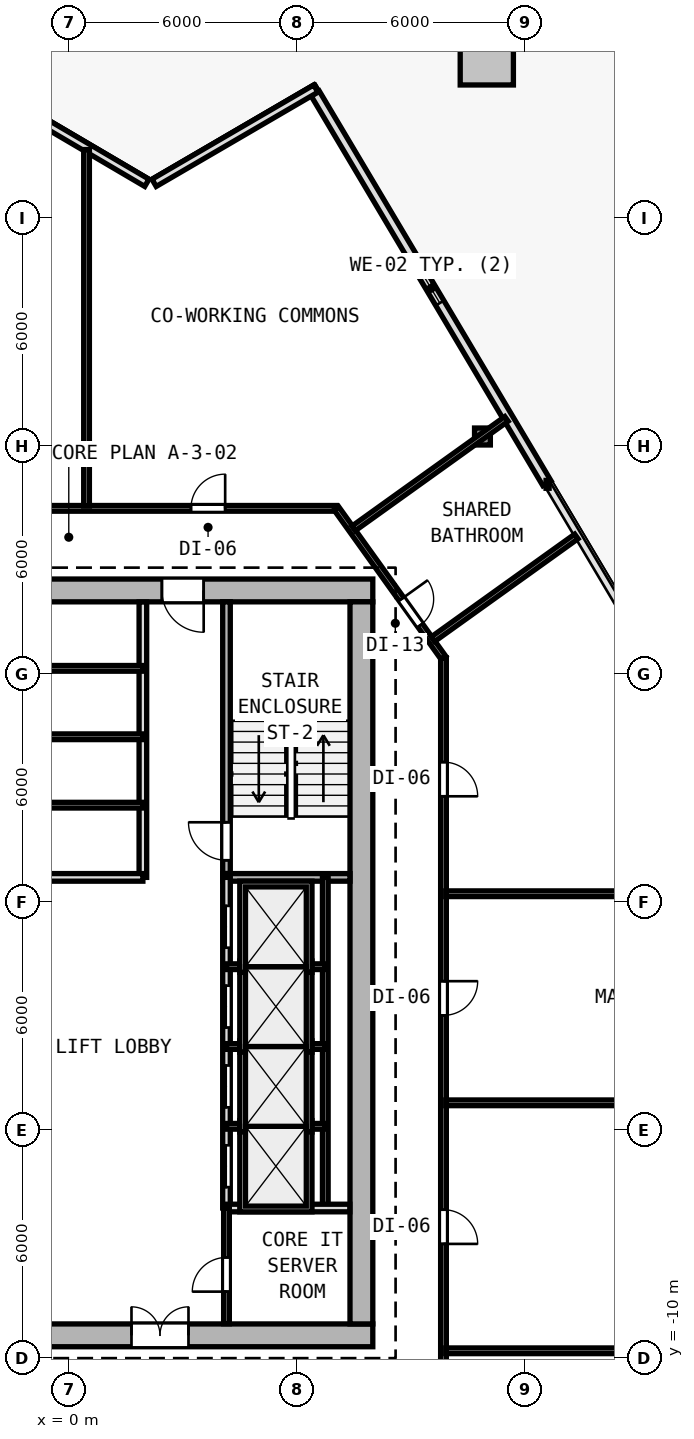
"""IFC4 building model, lengths in metres.
Left out: names, types, materials, properties, quantities, classifications, styles, units other than length and angle.
Written with IfcOpenShell. Run it as: python <this file> out.ifc"""

import sys

from ifc_helpers import new_model, si_unit, direction, frame, frame_2d, origin, origin_2d, place, context, subcontext, project, spatial, rectangle, i_section, extrude, element, fill, save


model = new_model("IFC4")
c1 = context("Model", 3, precision=1e-05, world=origin(), true_north=direction((0.0, 1.0)))
c2 = subcontext(c1, "Body", "Model", "MODEL_VIEW")
j1 = project(units=[si_unit("LENGTHUNIT", "METRE"), si_unit("PLANEANGLEUNIT", "RADIAN")], contexts=[c1])
p1 = place(None, origin())
s1 = spatial("IfcSite", under=j1, at=p1, CompositionType="ELEMENT")
p2 = place(p1, origin())
s2 = spatial("IfcBuilding", under=s1, at=p2, CompositionType="ELEMENT")
p3 = place(p2, frame((0.0, 0.0, 26.4)))
s3 = spatial("IfcBuildingStorey", under=s2, at=p3, CompositionType="ELEMENT", Elevation=26.4)
for number, where, z_axis, x_axis in (
    (1, (7.7, -9.4, 0.0), (0.0, 0.0, 1.0), (1.0, 0.0, 0.0)),
    (2, (7.7, 10.2, 0.0), (0.0, 0.0, 1.0), (1.0, 0.0, 0.0)),
    (3, (0.0, -9.4, 0.0), (0.0, 0.0, 1.0), (1.0, 0.0, 0.0)),
    (4, (7.7, 0.4, 0.0), (0.0, 0.0, 1.0), (1.0, 0.0, 0.0)),
):
    element("IfcColumn", number, at=place(p3, frame(where, z_axis=z_axis, x_axis=x_axis)), inside=s3, PredefinedType="COLUMN", context=c2, shape_type="SweptSolid", body=[
        extrude(i_section(OverallWidth=0.416, OverallDepth=0.446, WebThickness=0.025, FlangeThickness=0.04, FilletRadius=0.015, at=origin_2d()), origin(), (0.0, 0.0, 1.0), 3.6),
    ])
p4 = place(p3, frame((10.885, 14.25, 0.015), z_axis=(-0.0117309588, -0.002591723456, 0.999927831183), x_axis=(0.215728093413, -0.976453475447, 0.0)))
e5 = element("IfcColumn", 5, at=p4, inside=s3, PredefinedType="COLUMN", context=c2, shape_type="SweptSolid", body=[
    extrude(i_section(OverallWidth=0.416, OverallDepth=0.446, WebThickness=0.025, FlangeThickness=0.04, FilletRadius=0.015, at=origin_2d()), origin(), (0.0, 0.0, 1.0), 3.58),
])
p5 = place(p3, frame((6.483, 23.278, 0.0), z_axis=(0.0, 0.0, 1.0), x_axis=(0.511086421046, -0.859529330635, 0.0)))
e6 = element("IfcWall", 6, at=p5, inside=s3, PredefinedType="SOLIDWALL", context=c2, shape_type="SweptSolid", body=[
    extrude(rectangle(XDim=11.935, YDim=0.25, at=frame_2d((5.968, 0.0))), origin(), (0.0, 0.0, 1.0), 3.35),
])
p6 = place(p5, frame((5.518, 0.0, 0.62)))
e7 = element("IfcOpeningElement", 7, at=p6, cuts=e6, PredefinedType="OPENING", context=c2, shape_type="SweptSolid", body=[
    extrude(rectangle(XDim=0.9, YDim=1.6, at=frame_2d((0.45, 0.8))), frame((0.0, 0.135, 0.0), z_axis=(0.0, -1.0, 0.0), x_axis=(1.0, 0.0, 0.0)), (0.0, 0.0, 1.0), 0.27),
])
p7 = place(p3, frame((2.245, 20.925, 0.0), z_axis=(0.0, 0.0, 1.0), x_axis=(0.863967641515, 0.503547330858, 0.0)))
e8 = element("IfcWall", 8, at=p7, inside=s3, PredefinedType="SOLIDWALL", context=c2, shape_type="SweptSolid", body=[
    extrude(rectangle(XDim=4.925, YDim=0.22, at=frame_2d((2.462, 0.0))), origin(), (0.0, 0.0, 1.0), 3.35),
])
p8 = place(p3, frame((-2.635, 23.681, 0.0), z_axis=(0.0, 0.0, 1.0), x_axis=(0.862126841454, -0.506692519428, 0.0)))
e9 = element("IfcWall", 9, at=p8, inside=s3, PredefinedType="SOLIDWALL", context=c2, shape_type="SweptSolid", body=[
    extrude(rectangle(XDim=5.439, YDim=0.22, at=frame_2d((2.72, 0.0))), origin(), (0.0, 0.0, 1.0), 3.35),
])
p9 = place(p3, frame((-8.0, -9.4, 0.0), z_axis=(0.0, 0.0, 1.0), x_axis=(1.0, 0.0, 0.0)))
e10 = element("IfcWall", 10, at=p9, inside=s3, PredefinedType="SHEAR", context=c2, shape_type="SweptSolid", body=[
    extrude(rectangle(XDim=16.0, YDim=0.6, at=frame_2d((8.0, 0.0))), origin(), (0.0, 0.0, 1.0), 3.35),
])
p10 = place(p9, frame((9.65, 0.0, 0.0)))
e11 = element("IfcOpeningElement", 11, at=p10, cuts=e10, PredefinedType="OPENING", context=c2, shape_type="SweptSolid", body=[
    extrude(rectangle(XDim=1.5, YDim=2.2, at=frame_2d((0.75, 1.1))), frame((0.0, 0.31, 0.0), z_axis=(0.0, -1.0, 0.0), x_axis=(1.0, 0.0, 0.0)), (0.0, 0.0, 1.0), 0.62),
])
p11 = place(p3, frame((8.0, 10.2, 0.0), z_axis=(0.0, 0.0, 1.0), x_axis=(-1.0, 0.0, 0.0)))
e12 = element("IfcWall", 12, at=p11, inside=s3, PredefinedType="SHEAR", context=c2, shape_type="SweptSolid", body=[
    extrude(rectangle(XDim=16.0, YDim=0.6, at=frame_2d((8.0, 0.0))), origin(), (0.0, 0.0, 1.0), 3.35),
])
p12 = place(p11, frame((4.45, 0.0, 0.0)))
e13 = element("IfcOpeningElement", 13, at=p12, cuts=e12, PredefinedType="OPENING", context=c2, shape_type="SweptSolid", body=[
    extrude(rectangle(XDim=1.1, YDim=2.15, at=frame_2d((0.55, 1.075))), frame((0.0, 0.31, 0.0), z_axis=(0.0, -1.0, 0.0), x_axis=(1.0, 0.0, 0.0)), (0.0, 0.0, 1.0), 0.62),
])
p13 = place(p3, frame((7.7, 9.9, 0.0), z_axis=(0.0, 0.0, 1.0), x_axis=(0.0, -1.0, 0.0)))
e14 = element("IfcWall", 14, at=p13, inside=s3, PredefinedType="SHEAR", context=c2, shape_type="SweptSolid", body=[
    extrude(rectangle(XDim=19.0, YDim=0.6, at=frame_2d((9.5, 0.0))), origin(), (0.0, 0.0, 1.0), 3.35),
])
p14 = place(p3, frame((4.15, 2.75, 0.0), z_axis=(0.0, 0.0, 1.0), x_axis=(0.0, 1.0, 0.0)))
e15 = element("IfcWall", 15, at=p14, inside=s3, PredefinedType="SOLIDWALL", context=c2, shape_type="SweptSolid", body=[
    extrude(rectangle(XDim=7.15, YDim=0.2, at=frame_2d((3.575, 0.0))), origin(), (0.0, 0.0, 1.0), 3.35),
])
p15 = place(p14, frame((0.35, 0.0, 0.0)))
e16 = element("IfcOpeningElement", 16, at=p15, cuts=e15, PredefinedType="OPENING", context=c2, shape_type="SweptSolid", body=[
    extrude(rectangle(XDim=1.0, YDim=2.15, at=frame_2d((0.5, 1.075))), frame((0.0, 0.11, 0.0), z_axis=(0.0, -1.0, 0.0), x_axis=(1.0, 0.0, 0.0)), (0.0, 0.0, 1.0), 0.22),
])
p16 = place(p3, frame((4.05, 2.65, 0.0), z_axis=(0.0, 0.0, 1.0), x_axis=(1.0, 0.0, 0.0)))
e17 = element("IfcWall", 17, at=p16, inside=s3, PredefinedType="SOLIDWALL", context=c2, shape_type="SweptSolid", body=[
    extrude(rectangle(XDim=3.35, YDim=0.2, at=frame_2d((1.675, 0.0))), origin(), (0.0, 0.0, 1.0), 3.35),
])
p17 = place(p3, frame((4.15, -6.05, 0.0), z_axis=(0.0, 0.0, 1.0), x_axis=(0.0, 1.0, 0.0)))
e18 = element("IfcWall", 18, at=p17, inside=s3, PredefinedType="SOLIDWALL", context=c2, shape_type="SweptSolid", body=[
    extrude(rectangle(XDim=8.7, YDim=0.2, at=frame_2d((4.35, 0.0))), origin(), (0.0, 0.0, 1.0), 3.35),
])
p18 = place(p17, frame((0.55, 0.0, 0.0)))
e19 = element("IfcOpeningElement", 19, at=p18, cuts=e18, PredefinedType="OPENING", context=c2, shape_type="SweptSolid", body=[
    extrude(rectangle(XDim=1.1, YDim=2.15, at=frame_2d((0.55, 1.075))), frame((0.0, 0.11, 0.0), z_axis=(0.0, -1.0, 0.0), x_axis=(1.0, 0.0, 0.0)), (0.0, 0.0, 1.0), 0.22),
])
p19 = place(p17, frame((2.65, 0.0, 0.0)))
e20 = element("IfcOpeningElement", 20, at=p19, cuts=e18, PredefinedType="OPENING", context=c2, shape_type="SweptSolid", body=[
    extrude(rectangle(XDim=1.1, YDim=2.15, at=frame_2d((0.55, 1.075))), frame((0.0, 0.11, 0.0), z_axis=(0.0, -1.0, 0.0), x_axis=(1.0, 0.0, 0.0)), (0.0, 0.0, 1.0), 0.22),
])
p20 = place(p17, frame((4.75, 0.0, 0.0)))
e21 = element("IfcOpeningElement", 21, at=p20, cuts=e18, PredefinedType="OPENING", context=c2, shape_type="SweptSolid", body=[
    extrude(rectangle(XDim=1.1, YDim=2.15, at=frame_2d((0.55, 1.075))), frame((0.0, 0.11, 0.0), z_axis=(0.0, -1.0, 0.0), x_axis=(1.0, 0.0, 0.0)), (0.0, 0.0, 1.0), 0.22),
])
p21 = place(p17, frame((6.85, 0.0, 0.0)))
e22 = element("IfcOpeningElement", 22, at=p21, cuts=e18, PredefinedType="OPENING", context=c2, shape_type="SweptSolid", body=[
    extrude(rectangle(XDim=1.1, YDim=2.15, at=frame_2d((0.55, 1.075))), frame((0.0, 0.11, 0.0), z_axis=(0.0, -1.0, 0.0), x_axis=(1.0, 0.0, 0.0)), (0.0, 0.0, 1.0), 0.22),
])
p22 = place(p3, frame((6.75, -6.05, 0.0), z_axis=(0.0, 0.0, 1.0), x_axis=(0.0, 1.0, 0.0)))
e23 = element("IfcWall", 23, at=p22, inside=s3, PredefinedType="PARTITIONING", context=c2, shape_type="SweptSolid", body=[
    extrude(rectangle(XDim=8.7, YDim=0.15, at=frame_2d((4.35, 0.0))), origin(), (0.0, 0.0, 1.0), 3.35),
])
for number, where, z_axis, x_axis in (
    (24, (4.15, -3.9, 0.0), (0.0, 0.0, 1.0), (1.0, 0.0, 0.0)),
    (25, (4.15, -1.8, 0.0), (0.0, 0.0, 1.0), (1.0, 0.0, 0.0)),
    (26, (4.15, 0.3, 0.0), (0.0, 0.0, 1.0), (1.0, 0.0, 0.0)),
):
    element("IfcWall", number, at=place(p3, frame(where, z_axis=z_axis, x_axis=x_axis)), inside=s3, PredefinedType="PARTITIONING", context=c2, shape_type="SweptSolid", body=[
        extrude(rectangle(XDim=2.6, YDim=0.15, at=frame_2d((1.3, 0.0))), origin(), (0.0, 0.0, 1.0), 3.35),
    ])
p23 = place(p3, frame((1.95, 2.65, 0.0), z_axis=(0.0, 0.0, 1.0), x_axis=(0.0, 1.0, 0.0)))
e27 = element("IfcWall", 27, at=p23, inside=s3, PredefinedType="SOLIDWALL", context=c2, shape_type="SweptSolid", body=[
    extrude(rectangle(XDim=7.245, YDim=0.2, at=frame_2d((3.623, 0.0))), origin(), (0.0, 0.0, 1.0), 3.35),
])
p24 = place(p3, frame((-0.95, 2.65, 0.0), z_axis=(0.0, 0.0, 1.0), x_axis=(1.0, 0.0, 0.0)))
e28 = element("IfcWall", 28, at=p24, inside=s3, PredefinedType="SOLIDWALL", context=c2, shape_type="SweptSolid", body=[
    extrude(rectangle(XDim=2.9, YDim=0.2, at=frame_2d((1.45, 0.0))), origin(), (0.0, 0.0, 1.0), 3.35),
])
for number, where, z_axis, x_axis in (
    (29, (-0.75, 4.55, 0.0), (0.0, 0.0, 1.0), (1.0, 0.0, 0.0)),
    (30, (-0.75, 6.35, 0.0), (0.0, 0.0, 1.0), (1.0, 0.0, 0.0)),
    (31, (-0.75, 8.15, 0.0), (0.0, 0.0, 1.0), (1.0, 0.0, 0.0)),
):
    element("IfcWall", number, at=place(p3, frame(where, z_axis=z_axis, x_axis=x_axis)), inside=s3, PredefinedType="PARTITIONING", context=c2, shape_type="SweptSolid", body=[
        extrude(rectangle(XDim=2.7, YDim=0.15, at=frame_2d((1.35, 0.0))), origin(), (0.0, 0.0, 1.0), 3.35),
    ])
p25 = place(p3, frame((4.15, -6.05, 0.0), z_axis=(0.0, 0.0, 1.0), x_axis=(1.0, 0.0, 0.0)))
e32 = element("IfcWall", 32, at=p25, inside=s3, PredefinedType="SOLIDWALL", context=c2, shape_type="SweptSolid", body=[
    extrude(rectangle(XDim=3.245, YDim=0.2, at=frame_2d((1.623, 0.0))), origin(), (0.0, 0.0, 1.0), 3.35),
])
p26 = place(p3, frame((4.15, -9.095, 0.0), z_axis=(0.0, 0.0, 1.0), x_axis=(0.0, 1.0, 0.0)))
e33 = element("IfcWall", 33, at=p26, inside=s3, PredefinedType="PARTITIONING", context=c2, shape_type="SweptSolid", body=[
    extrude(rectangle(XDim=3.045, YDim=0.15, at=frame_2d((1.522, 0.0))), origin(), (0.0, 0.0, 1.0), 3.35),
])
p27 = place(p26, frame((0.845, 0.0, 0.0)))
e34 = element("IfcOpeningElement", 34, at=p27, cuts=e33, PredefinedType="OPENING", context=c2, shape_type="SweptSolid", body=[
    extrude(rectangle(XDim=0.9, YDim=2.1, at=frame_2d((0.45, 1.05))), frame((0.0, 0.085, 0.0), z_axis=(0.0, -1.0, 0.0), x_axis=(1.0, 0.0, 0.0)), (0.0, 0.0, 1.0), 0.17),
])
p28 = place(p3, frame((-7.041, 12.36, 0.0), z_axis=(0.0, 0.0, 1.0), x_axis=(1.0, 0.0, 0.0)))
e35 = element("IfcWall", 35, at=p28, inside=s3, PredefinedType="PARTITIONING", context=c2, shape_type="SweptSolid", body=[
    extrude(rectangle(XDim=14.082, YDim=0.15, at=frame_2d((7.041, 0.0))), origin(), (0.0, 0.0, 1.0), 3.35),
])
p29 = place(p28, frame((10.256, 0.0, 0.0)))
e36 = element("IfcOpeningElement", 36, at=p29, cuts=e35, PredefinedType="OPENING", context=c2, shape_type="SweptSolid", body=[
    extrude(rectangle(XDim=0.9, YDim=2.1, at=frame_2d((0.45, 1.05))), frame((0.0, 0.085, 0.0), z_axis=(0.0, -1.0, 0.0), x_axis=(1.0, 0.0, 0.0)), (0.0, 0.0, 1.0), 0.17),
])
p30 = place(p28, frame((3.393, 0.0, 0.0)))
e37 = element("IfcOpeningElement", 37, at=p30, cuts=e35, PredefinedType="OPENING", context=c2, shape_type="SweptSolid", body=[
    extrude(rectangle(XDim=0.9, YDim=2.1, at=frame_2d((0.45, 1.05))), frame((0.0, 0.085, 0.0), z_axis=(0.0, -1.0, 0.0), x_axis=(1.0, 0.0, 0.0)), (0.0, 0.0, 1.0), 0.17),
])
p31 = place(p3, frame((7.041, 12.36, 0.0), z_axis=(0.0, 0.0, 1.0), x_axis=(0.582449511476, -0.812866881218, 0.0)))
e38 = element("IfcWall", 38, at=p31, inside=s3, PredefinedType="PARTITIONING", context=c2, shape_type="SweptSolid", body=[
    extrude(rectangle(XDim=4.84, YDim=0.15, at=frame_2d((2.42, 0.0))), origin(), (0.0, 0.0, 1.0), 2.725),
])
p32 = place(p31, frame((2.937, 0.0, 0.0)))
e39 = element("IfcOpeningElement", 39, at=p32, cuts=e38, PredefinedType="OPENING", context=c2, shape_type="SweptSolid", body=[
    extrude(rectangle(XDim=0.85, YDim=2.1, at=frame_2d((0.425, 1.05))), frame((0.0, 0.085, 0.0), z_axis=(0.0, -1.0, 0.0), x_axis=(1.0, 0.0, 0.0)), (0.0, 0.0, 1.0), 0.17),
])
p33 = place(p3, frame((9.86, 8.426, 0.0), z_axis=(0.0, 0.0, 1.0), x_axis=(0.0, -1.0, 0.0)))
e40 = element("IfcWall", 40, at=p33, inside=s3, PredefinedType="PARTITIONING", context=c2, shape_type="SweptSolid", body=[
    extrude(rectangle(XDim=19.986, YDim=0.15, at=frame_2d((9.993, 0.0))), origin(), (0.0, 0.0, 1.0), 2.609),
])
p34 = place(p33, frame((18.67, 0.0, 0.0)))
e41 = element("IfcOpeningElement", 41, at=p34, cuts=e40, PredefinedType="OPENING", context=c2, shape_type="SweptSolid", body=[
    extrude(rectangle(XDim=0.85, YDim=2.1, at=frame_2d((0.425, 1.05))), frame((0.0, 0.085, 0.0), z_axis=(0.0, -1.0, 0.0), x_axis=(1.0, 0.0, 0.0)), (0.0, 0.0, 1.0), 0.17),
])
p35 = place(p33, frame((14.52, 0.0, 0.0)))
e42 = element("IfcOpeningElement", 42, at=p35, cuts=e40, PredefinedType="OPENING", context=c2, shape_type="SweptSolid", body=[
    extrude(rectangle(XDim=0.9, YDim=2.1, at=frame_2d((0.45, 1.05))), frame((0.0, 0.085, 0.0), z_axis=(0.0, -1.0, 0.0), x_axis=(1.0, 0.0, 0.0)), (0.0, 0.0, 1.0), 0.17),
])
p36 = place(p33, frame((8.507, 0.0, 0.0)))
e43 = element("IfcOpeningElement", 43, at=p36, cuts=e40, PredefinedType="OPENING", context=c2, shape_type="SweptSolid", body=[
    extrude(rectangle(XDim=0.9, YDim=2.1, at=frame_2d((0.45, 1.05))), frame((0.0, 0.085, 0.0), z_axis=(0.0, -1.0, 0.0), x_axis=(1.0, 0.0, 0.0)), (0.0, 0.0, 1.0), 0.17),
])
p37 = place(p33, frame((2.742, 0.0, 0.0)))
e44 = element("IfcOpeningElement", 44, at=p37, cuts=e40, PredefinedType="OPENING", context=c2, shape_type="SweptSolid", body=[
    extrude(rectangle(XDim=0.9, YDim=2.1, at=frame_2d((0.45, 1.05))), frame((0.0, 0.085, 0.0), z_axis=(0.0, -1.0, 0.0), x_axis=(1.0, 0.0, 0.0)), (0.0, 0.0, 1.0), 0.17),
])
p38 = place(p3, frame((9.92, -9.807, 0.0), z_axis=(0.0, 0.0, 1.0), x_axis=(1.0, 0.0, 0.0)))
e45 = element("IfcWall", 45, at=p38, inside=s3, PredefinedType="PARTITIONING", context=c2, shape_type="SweptSolid", body=[
    extrude(rectangle(XDim=16.178, YDim=0.15, at=frame_2d((8.089, 0.0))), origin(), (0.0, 0.0, 1.0), 2.609),
])
p39 = place(p3, frame((9.92, 2.219, 0.0), z_axis=(0.0, 0.0, 1.0), x_axis=(1.0, 0.0, 0.0)))
e46 = element("IfcWall", 46, at=p39, inside=s3, PredefinedType="PARTITIONING", context=c2, shape_type="SweptSolid", body=[
    extrude(rectangle(XDim=9.027, YDim=0.15, at=frame_2d((4.513, 0.0))), origin(), (0.0, 0.0, 1.0), 2.735),
])
p40 = place(p3, frame((7.494, 11.831, 0.0), z_axis=(0.0, 0.0, 1.0), x_axis=(0.812879401772, 0.582432037386, 0.0)))
e47 = element("IfcWall", 47, at=p40, inside=s3, PredefinedType="PARTITIONING", context=c2, shape_type="SweptSolid", body=[
    extrude(rectangle(XDim=4.95, YDim=0.15, at=frame_2d((2.475, 0.0))), origin(), (0.0, 0.0, 1.0), 2.725),
])
p41 = place(p3, frame((9.92, -3.282, 0.0), z_axis=(0.0, 0.0, 1.0), x_axis=(1.0, 0.0, 0.0)))
e48 = element("IfcWall", 48, at=p41, inside=s3, PredefinedType="PARTITIONING", context=c2, shape_type="SweptSolid", body=[
    extrude(rectangle(XDim=12.298, YDim=0.15, at=frame_2d((6.149, 0.0))), origin(), (0.0, 0.0, 1.0), 2.735),
])
p42 = place(p3, frame((9.582, 8.917, 0.0), z_axis=(0.0, 0.0, 1.0), x_axis=(0.812883510428, 0.582426303041, 0.0)))
e49 = element("IfcWall", 49, at=p42, inside=s3, PredefinedType="PARTITIONING", context=c2, shape_type="SweptSolid", body=[
    extrude(rectangle(XDim=4.643, YDim=0.15, at=frame_2d((2.322, 0.0))), origin(), (0.0, 0.0, 1.0), 2.735),
])
p43 = place(p3, frame((0.468, 12.42, 0.0), z_axis=(0.0, 0.0, 1.0), x_axis=(0.0, 1.0, 0.0)))
e50 = element("IfcWall", 50, at=p43, inside=s3, PredefinedType="PARTITIONING", context=c2, shape_type="SweptSolid", body=[
    extrude(rectangle(XDim=9.38, YDim=0.15, at=frame_2d((4.69, 0.0))), origin(), (0.0, 0.0, 1.0), 2.735),
])
p44 = place(p6, origin())
e51 = element("IfcWindow", 51, at=p44, inside=s3, PartitioningType="SINGLE_PANEL", PredefinedType="WINDOW", context=c2, shape_type="SweptSolid", body=[
    extrude(rectangle(XDim=0.9, YDim=1.6, at=frame_2d((0.45, 0.8))), frame((0.0, 0.03, 0.0), z_axis=(0.0, -1.0, 0.0), x_axis=(1.0, 0.0, 0.0)), (0.0, 0.0, 1.0), 0.06),
])
fill(e7, e51)
p45 = place(p10, origin())
e52 = element("IfcDoor", 52, at=p45, inside=s3, OperationType="DOUBLE_DOOR_SINGLE_SWING", PredefinedType="DOOR", context=c2, shape_type="SweptSolid", body=[
    extrude(rectangle(XDim=1.5, YDim=2.2, at=frame_2d((0.75, 1.1))), frame((0.0, 0.025, 0.0), z_axis=(0.0, -1.0, 0.0), x_axis=(1.0, 0.0, 0.0)), (0.0, 0.0, 1.0), 0.05),
])
fill(e11, e52)
p46 = place(p12, origin())
e53 = element("IfcDoor", 53, at=p46, inside=s3, OperationType="SINGLE_SWING_LEFT", PredefinedType="DOOR", context=c2, shape_type="SweptSolid", body=[
    extrude(rectangle(XDim=1.1, YDim=2.15, at=frame_2d((0.55, 1.075))), frame((0.0, 0.025, 0.0), z_axis=(0.0, -1.0, 0.0), x_axis=(1.0, 0.0, 0.0)), (0.0, 0.0, 1.0), 0.05),
])
fill(e13, e53)
p47 = place(p15, origin())
e54 = element("IfcDoor", 54, at=p47, inside=s3, OperationType="SINGLE_SWING_RIGHT", PredefinedType="DOOR", context=c2, shape_type="SweptSolid", body=[
    extrude(rectangle(XDim=1.0, YDim=2.15, at=frame_2d((0.5, 1.075))), frame((0.0, 0.025, 0.0), z_axis=(0.0, -1.0, 0.0), x_axis=(1.0, 0.0, 0.0)), (0.0, 0.0, 1.0), 0.05),
])
fill(e16, e54)
p48 = place(p18, origin())
e55 = element("IfcDoor", 55, at=p48, inside=s3, OperationType="DOUBLE_DOOR_SLIDING", PredefinedType="DOOR", context=c2, shape_type="SweptSolid", body=[
    extrude(rectangle(XDim=1.1, YDim=2.15, at=frame_2d((0.55, 1.075))), frame((0.0, 0.025, 0.0), z_axis=(0.0, -1.0, 0.0), x_axis=(1.0, 0.0, 0.0)), (0.0, 0.0, 1.0), 0.05),
])
fill(e19, e55)
p49 = place(p19, origin())
e56 = element("IfcDoor", 56, at=p49, inside=s3, OperationType="DOUBLE_DOOR_SLIDING", PredefinedType="DOOR", context=c2, shape_type="SweptSolid", body=[
    extrude(rectangle(XDim=1.1, YDim=2.15, at=frame_2d((0.55, 1.075))), frame((0.0, 0.025, 0.0), z_axis=(0.0, -1.0, 0.0), x_axis=(1.0, 0.0, 0.0)), (0.0, 0.0, 1.0), 0.05),
])
fill(e20, e56)
p50 = place(p20, origin())
e57 = element("IfcDoor", 57, at=p50, inside=s3, OperationType="DOUBLE_DOOR_SLIDING", PredefinedType="DOOR", context=c2, shape_type="SweptSolid", body=[
    extrude(rectangle(XDim=1.1, YDim=2.15, at=frame_2d((0.55, 1.075))), frame((0.0, 0.025, 0.0), z_axis=(0.0, -1.0, 0.0), x_axis=(1.0, 0.0, 0.0)), (0.0, 0.0, 1.0), 0.05),
])
fill(e21, e57)
p51 = place(p21, origin())
e58 = element("IfcDoor", 58, at=p51, inside=s3, OperationType="DOUBLE_DOOR_SLIDING", PredefinedType="DOOR", context=c2, shape_type="SweptSolid", body=[
    extrude(rectangle(XDim=1.1, YDim=2.15, at=frame_2d((0.55, 1.075))), frame((0.0, 0.025, 0.0), z_axis=(0.0, -1.0, 0.0), x_axis=(1.0, 0.0, 0.0)), (0.0, 0.0, 1.0), 0.05),
])
fill(e22, e58)
p52 = place(p27, origin())
e59 = element("IfcDoor", 59, at=p52, inside=s3, OperationType="SINGLE_SWING_LEFT", PredefinedType="DOOR", context=c2, shape_type="SweptSolid", body=[
    extrude(rectangle(XDim=0.9, YDim=2.1, at=frame_2d((0.45, 1.05))), frame((0.0, 0.025, 0.0), z_axis=(0.0, -1.0, 0.0), x_axis=(1.0, 0.0, 0.0)), (0.0, 0.0, 1.0), 0.05),
])
fill(e34, e59)
p53 = place(p35, origin())
e60 = element("IfcDoor", 60, at=p53, inside=s3, OperationType="SINGLE_SWING_RIGHT", PredefinedType="DOOR", context=c2, shape_type="SweptSolid", body=[
    extrude(rectangle(XDim=0.9, YDim=2.1, at=frame_2d((0.45, 1.05))), frame((0.0, 0.025, 0.0), z_axis=(0.0, -1.0, 0.0), x_axis=(1.0, 0.0, 0.0)), (0.0, 0.0, 1.0), 0.05),
])
fill(e42, e60)
p54 = place(p36, origin())
e61 = element("IfcDoor", 61, at=p54, inside=s3, OperationType="SINGLE_SWING_LEFT", PredefinedType="DOOR", context=c2, shape_type="SweptSolid", body=[
    extrude(rectangle(XDim=0.9, YDim=2.1, at=frame_2d((0.45, 1.05))), frame((0.0, 0.025, 0.0), z_axis=(0.0, -1.0, 0.0), x_axis=(1.0, 0.0, 0.0)), (0.0, 0.0, 1.0), 0.05),
])
fill(e43, e61)
p55 = place(p37, origin())
e62 = element("IfcDoor", 62, at=p55, inside=s3, OperationType="SINGLE_SWING_RIGHT", PredefinedType="DOOR", context=c2, shape_type="SweptSolid", body=[
    extrude(rectangle(XDim=0.9, YDim=2.1, at=frame_2d((0.45, 1.05))), frame((0.0, 0.025, 0.0), z_axis=(0.0, -1.0, 0.0), x_axis=(1.0, 0.0, 0.0)), (0.0, 0.0, 1.0), 0.05),
])
fill(e44, e62)
p56 = place(p32, origin())
e63 = element("IfcDoor", 63, at=p56, inside=s3, OperationType="SINGLE_SWING_LEFT", PredefinedType="DOOR", context=c2, shape_type="SweptSolid", body=[
    extrude(rectangle(XDim=0.85, YDim=2.1, at=frame_2d((0.425, 1.05))), frame((0.0, 0.025, 0.0), z_axis=(0.0, -1.0, 0.0), x_axis=(1.0, 0.0, 0.0)), (0.0, 0.0, 1.0), 0.05),
])
fill(e39, e63)
p57 = place(p29, origin())
e64 = element("IfcDoor", 64, at=p57, inside=s3, OperationType="SINGLE_SWING_RIGHT", PredefinedType="DOOR", context=c2, shape_type="SweptSolid", body=[
    extrude(rectangle(XDim=0.9, YDim=2.1, at=frame_2d((0.45, 1.05))), frame((0.0, 0.025, 0.0), z_axis=(0.0, -1.0, 0.0), x_axis=(1.0, 0.0, 0.0)), (0.0, 0.0, 1.0), 0.05),
])
fill(e36, e64)
save(model, sys.argv[1])
